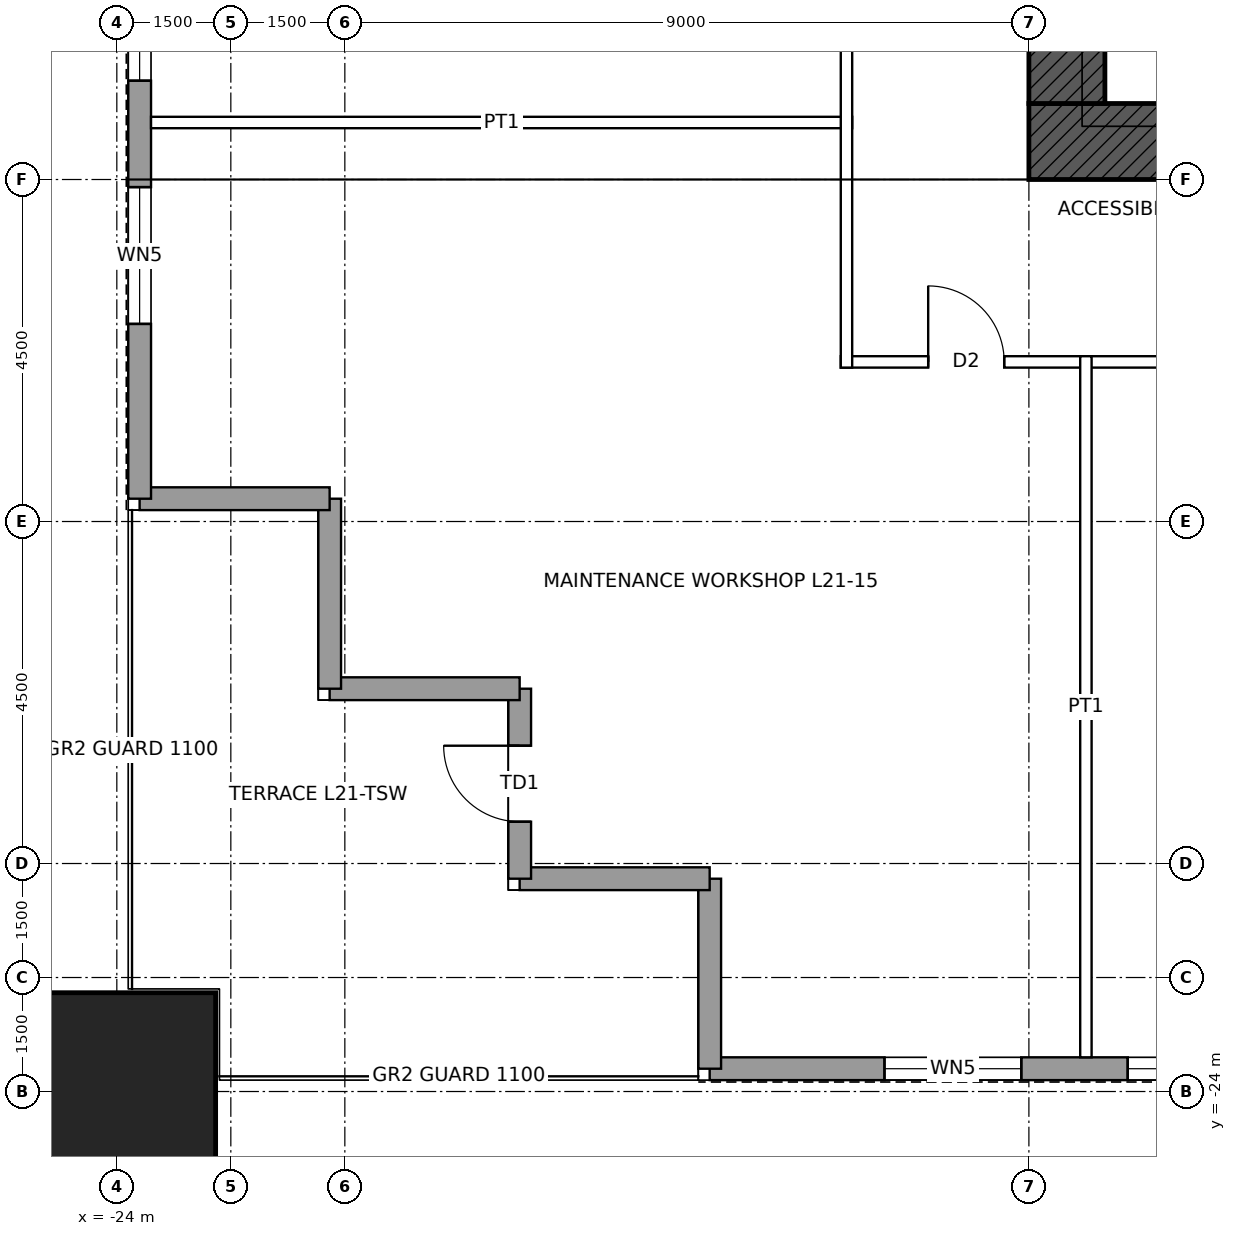
"""IFC4 building model, lengths in metres.
Left out: names, types, materials, properties, quantities, classifications, styles, units other than length and angle.
Written with IfcOpenShell. Run it as: python <this file> out.ifc"""

import sys

from ifc_helpers import new_model, si_unit, direction, frame, frame_2d, origin, origin_2d, place, context, subcontext, project, spatial, rectangle, hollow_rectangle, extrude, element, fill, save


model = new_model("IFC4")
c1 = context("Model", 3, precision=1e-05, world=origin(), true_north=direction((0.0, 1.0)))
c2 = subcontext(c1, "Body", "Model", "MODEL_VIEW")
j1 = project(units=[si_unit("LENGTHUNIT", "METRE"), si_unit("PLANEANGLEUNIT", "RADIAN")], contexts=[c1])
p1 = place(None, origin())
s1 = spatial("IfcSite", under=j1, at=p1, CompositionType="ELEMENT")
p2 = place(p1, origin())
s2 = spatial("IfcBuilding", under=s1, at=p2, CompositionType="ELEMENT")
p3 = place(p2, frame((0.0, 0.0, 108.9)))
s3 = spatial("IfcBuildingStorey", under=s2, at=p3, CompositionType="ELEMENT", Elevation=108.9)
p4 = place(p3, frame((-24.0, -24.0, 0.0), z_axis=(0.0, 0.0, 1.0), x_axis=(1.0, 0.0, 0.0)))
e1 = element("IfcColumn", 1, at=p4, inside=s3, PredefinedType="COLUMN", context=c2, shape_type="SweptSolid", body=[
    extrude(hollow_rectangle(XDim=2.6, YDim=2.6, WallThickness=0.13, at=origin_2d()), origin(), (0.0, 0.0, 1.0), 4.5),
])
p5 = place(p3, frame((12.0, -11.5, 0.0), z_axis=(0.0, 0.0, 1.0), x_axis=(-1.0, 0.0, 0.0)))
e2 = element("IfcWall", 2, at=p5, inside=s3, PredefinedType="SHEAR", context=c2, shape_type="SweptSolid", body=[
    extrude(rectangle(XDim=24.0, YDim=1.0, at=frame_2d((12.0, 0.0))), origin(), (0.0, 0.0, 1.0), 4.5),
])
p6 = place(p5, frame((11.5, 0.0, 0.0)))
e3 = element("IfcOpeningElement", 3, at=p6, cuts=e2, PredefinedType="OPENING", context=c2, shape_type="SweptSolid", body=[
    extrude(rectangle(XDim=1.0, YDim=2.1, at=frame_2d((0.5, 1.05))), frame((0.0, 0.51, 0.0), z_axis=(0.0, -1.0, 0.0), x_axis=(1.0, 0.0, 0.0)), (0.0, 0.0, 1.0), 1.02),
])
p7 = place(p5, frame((1.0, 0.0, 0.0)))
e4 = element("IfcOpeningElement", 4, at=p7, cuts=e2, PredefinedType="OPENING", context=c2, shape_type="SweptSolid", body=[
    extrude(rectangle(XDim=1.0, YDim=2.4, at=frame_2d((0.5, 1.2))), frame((0.0, 0.51, 0.0), z_axis=(0.0, -1.0, 0.0), x_axis=(1.0, 0.0, 0.0)), (0.0, 0.0, 1.0), 1.02),
])
p8 = place(p3, frame((-11.5, -11.0, 0.0), z_axis=(0.0, 0.0, 1.0), x_axis=(0.0, 1.0, 0.0)))
e5 = element("IfcWall", 5, at=p8, inside=s3, PredefinedType="SHEAR", context=c2, shape_type="SweptSolid", body=[
    extrude(rectangle(XDim=22.0, YDim=1.0, at=frame_2d((11.0, 0.0))), origin(), (0.0, 0.0, 1.0), 4.5),
])
p9 = place(p8, frame((10.5, 0.0, 0.0)))
e6 = element("IfcOpeningElement", 6, at=p9, cuts=e5, PredefinedType="OPENING", context=c2, shape_type="SweptSolid", body=[
    extrude(rectangle(XDim=1.0, YDim=2.4, at=frame_2d((0.5, 1.2))), frame((0.0, 0.51, 0.0), z_axis=(0.0, -1.0, 0.0), x_axis=(1.0, 0.0, 0.0)), (0.0, 0.0, 1.0), 1.02),
])
p10 = place(p3, frame((16.2, -23.7, 0.0), z_axis=(0.0, 0.0, 1.0), x_axis=(-1.0, 0.0, 0.0)))
e7 = element("IfcWall", 7, at=p10, inside=s3, PredefinedType="SOLIDWALL", context=c2, shape_type="SweptSolid", body=[
    extrude(rectangle(XDim=32.4, YDim=0.3, at=frame_2d((16.2, 0.0))), origin(), (0.0, 0.0, 1.0), 4.3),
])
p11 = place(p10, frame((2.3, 0.0, 1.0)))
e8 = element("IfcOpeningElement", 8, at=p11, cuts=e7, PredefinedType="OPENING", context=c2, shape_type="SweptSolid", body=[
    extrude(rectangle(XDim=1.8, YDim=1.2, at=frame_2d((0.9, 0.6))), frame((0.0, 0.16, 0.0), z_axis=(0.0, -1.0, 0.0), x_axis=(1.0, 0.0, 0.0)), (0.0, 0.0, 1.0), 0.32),
])
p12 = place(p10, frame((5.5, 0.0, 1.0)))
e9 = element("IfcOpeningElement", 9, at=p12, cuts=e7, PredefinedType="OPENING", context=c2, shape_type="SweptSolid", body=[
    extrude(rectangle(XDim=2.4, YDim=1.2, at=frame_2d((1.2, 0.6))), frame((0.0, 0.16, 0.0), z_axis=(0.0, -1.0, 0.0), x_axis=(1.0, 0.0, 0.0)), (0.0, 0.0, 1.0), 0.32),
])
p13 = place(p10, frame((9.5, 0.0, 1.0)))
e10 = element("IfcOpeningElement", 10, at=p13, cuts=e7, PredefinedType="OPENING", context=c2, shape_type="SweptSolid", body=[
    extrude(rectangle(XDim=2.4, YDim=1.2, at=frame_2d((1.2, 0.6))), frame((0.0, 0.16, 0.0), z_axis=(0.0, -1.0, 0.0), x_axis=(1.0, 0.0, 0.0)), (0.0, 0.0, 1.0), 0.32),
])
p14 = place(p10, frame((13.0, 0.0, 1.0)))
e11 = element("IfcOpeningElement", 11, at=p14, cuts=e7, PredefinedType="OPENING", context=c2, shape_type="SweptSolid", body=[
    extrude(rectangle(XDim=2.4, YDim=1.2, at=frame_2d((1.2, 0.6))), frame((0.0, 0.16, 0.0), z_axis=(0.0, -1.0, 0.0), x_axis=(1.0, 0.0, 0.0)), (0.0, 0.0, 1.0), 0.32),
])
p15 = place(p10, frame((17.0, 0.0, 1.0)))
e12 = element("IfcOpeningElement", 12, at=p15, cuts=e7, PredefinedType="OPENING", context=c2, shape_type="SweptSolid", body=[
    extrude(rectangle(XDim=2.4, YDim=1.2, at=frame_2d((1.2, 0.6))), frame((0.0, 0.16, 0.0), z_axis=(0.0, -1.0, 0.0), x_axis=(1.0, 0.0, 0.0)), (0.0, 0.0, 1.0), 0.32),
])
p16 = place(p10, frame((20.5, 0.0, 1.0)))
e13 = element("IfcOpeningElement", 13, at=p16, cuts=e7, PredefinedType="OPENING", context=c2, shape_type="SweptSolid", body=[
    extrude(rectangle(XDim=2.4, YDim=1.2, at=frame_2d((1.2, 0.6))), frame((0.0, 0.16, 0.0), z_axis=(0.0, -1.0, 0.0), x_axis=(1.0, 0.0, 0.0)), (0.0, 0.0, 1.0), 0.32),
])
p17 = place(p10, frame((24.5, 0.0, 1.0)))
e14 = element("IfcOpeningElement", 14, at=p17, cuts=e7, PredefinedType="OPENING", context=c2, shape_type="SweptSolid", body=[
    extrude(rectangle(XDim=2.4, YDim=1.2, at=frame_2d((1.2, 0.6))), frame((0.0, 0.16, 0.0), z_axis=(0.0, -1.0, 0.0), x_axis=(1.0, 0.0, 0.0)), (0.0, 0.0, 1.0), 0.32),
])
p18 = place(p10, frame((28.3, 0.0, 1.0)))
e15 = element("IfcOpeningElement", 15, at=p18, cuts=e7, PredefinedType="OPENING", context=c2, shape_type="SweptSolid", body=[
    extrude(rectangle(XDim=1.8, YDim=1.2, at=frame_2d((0.9, 0.6))), frame((0.0, 0.16, 0.0), z_axis=(0.0, -1.0, 0.0), x_axis=(1.0, 0.0, 0.0)), (0.0, 0.0, 1.0), 0.32),
])
for number, where, z_axis, x_axis in (
    (16, (-16.2, -23.7, 0.0), (0.0, 0.0, 1.0), (0.0, 1.0, 0.0)),
    (17, (-16.2, -21.2, 0.0), (0.0, 0.0, 1.0), (-1.0, 0.0, 0.0)),
):
    element("IfcWall", number, at=place(p3, frame(where, z_axis=z_axis, x_axis=x_axis)), inside=s3, PredefinedType="SOLIDWALL", context=c2, shape_type="SweptSolid", body=[
        extrude(rectangle(XDim=2.5, YDim=0.3, at=frame_2d((1.25, 0.0))), origin(), (0.0, 0.0, 1.0), 4.3),
    ])
p19 = place(p3, frame((-18.7, -21.2, 0.0), z_axis=(0.0, 0.0, 1.0), x_axis=(0.0, 1.0, 0.0)))
e18 = element("IfcWall", 18, at=p19, inside=s3, PredefinedType="SOLIDWALL", context=c2, shape_type="SweptSolid", body=[
    extrude(rectangle(XDim=2.5, YDim=0.3, at=frame_2d((1.25, 0.0))), origin(), (0.0, 0.0, 1.0), 4.3),
])
p20 = place(p19, frame((0.75, 0.0, 0.0)))
e19 = element("IfcOpeningElement", 19, at=p20, cuts=e18, PredefinedType="OPENING", context=c2, shape_type="SweptSolid", body=[
    extrude(rectangle(XDim=1.0, YDim=2.4, at=frame_2d((0.5, 1.2))), frame((0.0, 0.16, 0.0), z_axis=(0.0, -1.0, 0.0), x_axis=(1.0, 0.0, 0.0)), (0.0, 0.0, 1.0), 0.32),
])
for number, where, z_axis, x_axis in (
    (20, (-18.7, -18.7, 0.0), (0.0, 0.0, 1.0), (-1.0, 0.0, 0.0)),
    (21, (-21.2, -18.7, 0.0), (0.0, 0.0, 1.0), (0.0, 1.0, 0.0)),
    (22, (-21.2, -16.2, 0.0), (0.0, 0.0, 1.0), (-1.0, 0.0, 0.0)),
):
    element("IfcWall", number, at=place(p3, frame(where, z_axis=z_axis, x_axis=x_axis)), inside=s3, PredefinedType="SOLIDWALL", context=c2, shape_type="SweptSolid", body=[
        extrude(rectangle(XDim=2.5, YDim=0.3, at=frame_2d((1.25, 0.0))), origin(), (0.0, 0.0, 1.0), 4.3),
    ])
p21 = place(p3, frame((-23.7, -16.2, 0.0), z_axis=(0.0, 0.0, 1.0), x_axis=(0.0, 1.0, 0.0)))
e23 = element("IfcWall", 23, at=p21, inside=s3, PredefinedType="SOLIDWALL", context=c2, shape_type="SweptSolid", body=[
    extrude(rectangle(XDim=32.4, YDim=0.3, at=frame_2d((16.2, 0.0))), origin(), (0.0, 0.0, 1.0), 4.3),
])
p22 = place(p21, frame((2.3, 0.0, 1.0)))
e24 = element("IfcOpeningElement", 24, at=p22, cuts=e23, PredefinedType="OPENING", context=c2, shape_type="SweptSolid", body=[
    extrude(rectangle(XDim=1.8, YDim=1.2, at=frame_2d((0.9, 0.6))), frame((0.0, 0.16, 0.0), z_axis=(0.0, -1.0, 0.0), x_axis=(1.0, 0.0, 0.0)), (0.0, 0.0, 1.0), 0.32),
])
p23 = place(p21, frame((5.5, 0.0, 1.0)))
e25 = element("IfcOpeningElement", 25, at=p23, cuts=e23, PredefinedType="OPENING", context=c2, shape_type="SweptSolid", body=[
    extrude(rectangle(XDim=2.4, YDim=1.2, at=frame_2d((1.2, 0.6))), frame((0.0, 0.16, 0.0), z_axis=(0.0, -1.0, 0.0), x_axis=(1.0, 0.0, 0.0)), (0.0, 0.0, 1.0), 0.32),
])
p24 = place(p21, frame((9.5, 0.0, 1.0)))
e26 = element("IfcOpeningElement", 26, at=p24, cuts=e23, PredefinedType="OPENING", context=c2, shape_type="SweptSolid", body=[
    extrude(rectangle(XDim=2.4, YDim=1.2, at=frame_2d((1.2, 0.6))), frame((0.0, 0.16, 0.0), z_axis=(0.0, -1.0, 0.0), x_axis=(1.0, 0.0, 0.0)), (0.0, 0.0, 1.0), 0.32),
])
p25 = place(p21, frame((13.0, 0.0, 1.0)))
e27 = element("IfcOpeningElement", 27, at=p25, cuts=e23, PredefinedType="OPENING", context=c2, shape_type="SweptSolid", body=[
    extrude(rectangle(XDim=2.4, YDim=1.2, at=frame_2d((1.2, 0.6))), frame((0.0, 0.16, 0.0), z_axis=(0.0, -1.0, 0.0), x_axis=(1.0, 0.0, 0.0)), (0.0, 0.0, 1.0), 0.32),
])
p26 = place(p21, frame((17.0, 0.0, 1.0)))
e28 = element("IfcOpeningElement", 28, at=p26, cuts=e23, PredefinedType="OPENING", context=c2, shape_type="SweptSolid", body=[
    extrude(rectangle(XDim=2.4, YDim=1.2, at=frame_2d((1.2, 0.6))), frame((0.0, 0.16, 0.0), z_axis=(0.0, -1.0, 0.0), x_axis=(1.0, 0.0, 0.0)), (0.0, 0.0, 1.0), 0.32),
])
p27 = place(p21, frame((20.5, 0.0, 1.0)))
e29 = element("IfcOpeningElement", 29, at=p27, cuts=e23, PredefinedType="OPENING", context=c2, shape_type="SweptSolid", body=[
    extrude(rectangle(XDim=2.4, YDim=1.2, at=frame_2d((1.2, 0.6))), frame((0.0, 0.16, 0.0), z_axis=(0.0, -1.0, 0.0), x_axis=(1.0, 0.0, 0.0)), (0.0, 0.0, 1.0), 0.32),
])
p28 = place(p21, frame((24.5, 0.0, 1.0)))
e30 = element("IfcOpeningElement", 30, at=p28, cuts=e23, PredefinedType="OPENING", context=c2, shape_type="SweptSolid", body=[
    extrude(rectangle(XDim=2.4, YDim=1.2, at=frame_2d((1.2, 0.6))), frame((0.0, 0.16, 0.0), z_axis=(0.0, -1.0, 0.0), x_axis=(1.0, 0.0, 0.0)), (0.0, 0.0, 1.0), 0.32),
])
p29 = place(p21, frame((28.3, 0.0, 1.0)))
e31 = element("IfcOpeningElement", 31, at=p29, cuts=e23, PredefinedType="OPENING", context=c2, shape_type="SweptSolid", body=[
    extrude(rectangle(XDim=1.8, YDim=1.2, at=frame_2d((0.9, 0.6))), frame((0.0, 0.16, 0.0), z_axis=(0.0, -1.0, 0.0), x_axis=(1.0, 0.0, 0.0)), (0.0, 0.0, 1.0), 0.32),
])
p30 = place(p3, frame((-14.475, -14.4, 0.0), z_axis=(0.0, 0.0, 1.0), x_axis=(1.0, 0.0, 0.0)))
e32 = element("IfcWall", 32, at=p30, inside=s3, PredefinedType="PARTITIONING", context=c2, shape_type="SweptSolid", body=[
    extrude(rectangle(XDim=28.95, YDim=0.15, at=frame_2d((14.475, 0.0))), origin(), (0.0, 0.0, 1.0), 4.3),
])
p31 = place(p30, frame((21.075, 0.0, 0.0)))
e33 = element("IfcOpeningElement", 33, at=p31, cuts=e32, PredefinedType="OPENING", context=c2, shape_type="SweptSolid", body=[
    extrude(rectangle(XDim=1.8, YDim=2.4, at=frame_2d((0.9, 1.2))), frame((0.0, 0.085, 0.0), z_axis=(0.0, -1.0, 0.0), x_axis=(1.0, 0.0, 0.0)), (0.0, 0.0, 1.0), 0.17),
])
p32 = place(p30, frame((13.575, 0.0, 0.0)))
e34 = element("IfcOpeningElement", 34, at=p32, cuts=e32, PredefinedType="OPENING", context=c2, shape_type="SweptSolid", body=[
    extrude(rectangle(XDim=1.8, YDim=2.4, at=frame_2d((0.9, 1.2))), frame((0.0, 0.085, 0.0), z_axis=(0.0, -1.0, 0.0), x_axis=(1.0, 0.0, 0.0)), (0.0, 0.0, 1.0), 0.17),
])
p33 = place(p30, frame((6.475, 0.0, 0.0)))
e35 = element("IfcOpeningElement", 35, at=p33, cuts=e32, PredefinedType="OPENING", context=c2, shape_type="SweptSolid", body=[
    extrude(rectangle(XDim=1.0, YDim=2.1, at=frame_2d((0.5, 1.05))), frame((0.0, 0.085, 0.0), z_axis=(0.0, -1.0, 0.0), x_axis=(1.0, 0.0, 0.0)), (0.0, 0.0, 1.0), 0.17),
])
p34 = place(p30, frame((26.8, 0.0, 0.0)))
e36 = element("IfcOpeningElement", 36, at=p34, cuts=e32, PredefinedType="OPENING", context=c2, shape_type="SweptSolid", body=[
    extrude(rectangle(XDim=1.0, YDim=2.1, at=frame_2d((0.5, 1.05))), frame((0.0, 0.085, 0.0), z_axis=(0.0, -1.0, 0.0), x_axis=(1.0, 0.0, 0.0)), (0.0, 0.0, 1.0), 0.17),
])
p35 = place(p30, frame((1.15, 0.0, 0.0)))
e37 = element("IfcOpeningElement", 37, at=p35, cuts=e32, PredefinedType="OPENING", context=c2, shape_type="SweptSolid", body=[
    extrude(rectangle(XDim=1.0, YDim=2.1, at=frame_2d((0.5, 1.05))), frame((0.0, 0.085, 0.0), z_axis=(0.0, -1.0, 0.0), x_axis=(1.0, 0.0, 0.0)), (0.0, 0.0, 1.0), 0.17),
])
p36 = place(p3, frame((-23.55, -11.25, 0.0), z_axis=(0.0, 0.0, 1.0), x_axis=(1.0, 0.0, 0.0)))
e38 = element("IfcWall", 38, at=p36, inside=s3, PredefinedType="PARTITIONING", context=c2, shape_type="SweptSolid", body=[
    extrude(rectangle(XDim=9.225, YDim=0.15, at=frame_2d((4.613, 0.0))), origin(), (0.0, 0.0, 1.0), 3.431),
])
p37 = place(p3, frame((-14.4, -14.475, 0.0), z_axis=(0.0, 0.0, 1.0), x_axis=(0.0, 1.0, 0.0)))
e39 = element("IfcWall", 39, at=p37, inside=s3, PredefinedType="PARTITIONING", context=c2, shape_type="SweptSolid", body=[
    extrude(rectangle(XDim=28.95, YDim=0.15, at=frame_2d((14.475, 0.0))), origin(), (0.0, 0.0, 1.0), 4.3),
])
p38 = place(p37, frame((6.075, 0.0, 0.0)))
e40 = element("IfcOpeningElement", 40, at=p38, cuts=e39, PredefinedType="OPENING", context=c2, shape_type="SweptSolid", body=[
    extrude(rectangle(XDim=1.8, YDim=2.4, at=frame_2d((0.9, 1.2))), frame((0.0, 0.085, 0.0), z_axis=(0.0, -1.0, 0.0), x_axis=(1.0, 0.0, 0.0)), (0.0, 0.0, 1.0), 0.17),
])
p39 = place(p37, frame((17.325, 0.0, 0.0)))
e41 = element("IfcOpeningElement", 41, at=p39, cuts=e39, PredefinedType="OPENING", context=c2, shape_type="SweptSolid", body=[
    extrude(rectangle(XDim=1.8, YDim=2.4, at=frame_2d((0.9, 1.2))), frame((0.0, 0.085, 0.0), z_axis=(0.0, -1.0, 0.0), x_axis=(1.0, 0.0, 0.0)), (0.0, 0.0, 1.0), 0.17),
])
p40 = place(p3, frame((-11.25, -23.55, 0.0), z_axis=(0.0, 0.0, 1.0), x_axis=(0.0, 1.0, 0.0)))
e42 = element("IfcWall", 42, at=p40, inside=s3, PredefinedType="PARTITIONING", context=c2, shape_type="SweptSolid", body=[
    extrude(rectangle(XDim=9.225, YDim=0.15, at=frame_2d((4.613, 0.0))), origin(), (0.0, 0.0, 1.0), 3.431),
])
p41 = place(p17, origin())
e43 = element("IfcWindow", 43, at=p41, inside=s3, PartitioningType="SINGLE_PANEL", PredefinedType="WINDOW", context=c2, shape_type="SweptSolid", body=[
    extrude(rectangle(XDim=2.4, YDim=1.2, at=frame_2d((1.2, 0.6))), frame((0.0, 0.03, 0.0), z_axis=(0.0, -1.0, 0.0), x_axis=(1.0, 0.0, 0.0)), (0.0, 0.0, 1.0), 0.06),
])
fill(e14, e43)
p42 = place(p18, origin())
e44 = element("IfcWindow", 44, at=p42, inside=s3, PartitioningType="SINGLE_PANEL", PredefinedType="WINDOW", context=c2, shape_type="SweptSolid", body=[
    extrude(rectangle(XDim=1.8, YDim=1.2, at=frame_2d((0.9, 0.6))), frame((0.0, 0.03, 0.0), z_axis=(0.0, -1.0, 0.0), x_axis=(1.0, 0.0, 0.0)), (0.0, 0.0, 1.0), 0.06),
])
fill(e15, e44)
p43 = place(p20, origin())
e45 = element("IfcDoor", 45, at=p43, inside=s3, OperationType="SINGLE_SWING_RIGHT", PredefinedType="DOOR", context=c2, shape_type="SweptSolid", body=[
    extrude(rectangle(XDim=1.0, YDim=2.4, at=frame_2d((0.5, 1.2))), frame((0.0, 0.025, 0.0), z_axis=(0.0, -1.0, 0.0), x_axis=(1.0, 0.0, 0.0)), (0.0, 0.0, 1.0), 0.05),
])
fill(e19, e45)
p44 = place(p22, origin())
e46 = element("IfcWindow", 46, at=p44, inside=s3, PartitioningType="SINGLE_PANEL", PredefinedType="WINDOW", context=c2, shape_type="SweptSolid", body=[
    extrude(rectangle(XDim=1.8, YDim=1.2, at=frame_2d((0.9, 0.6))), frame((0.0, 0.03, 0.0), z_axis=(0.0, -1.0, 0.0), x_axis=(1.0, 0.0, 0.0)), (0.0, 0.0, 1.0), 0.06),
])
fill(e24, e46)
p45 = place(p23, origin())
e47 = element("IfcWindow", 47, at=p45, inside=s3, PartitioningType="SINGLE_PANEL", PredefinedType="WINDOW", context=c2, shape_type="SweptSolid", body=[
    extrude(rectangle(XDim=2.4, YDim=1.2, at=frame_2d((1.2, 0.6))), frame((0.0, 0.03, 0.0), z_axis=(0.0, -1.0, 0.0), x_axis=(1.0, 0.0, 0.0)), (0.0, 0.0, 1.0), 0.06),
])
fill(e25, e47)
p46 = place(p35, origin())
e48 = element("IfcDoor", 48, at=p46, inside=s3, OperationType="SINGLE_SWING_LEFT", PredefinedType="DOOR", context=c2, shape_type="SweptSolid", body=[
    extrude(rectangle(XDim=1.0, YDim=2.1, at=frame_2d((0.5, 1.05))), frame((0.0, 0.025, 0.0), z_axis=(0.0, -1.0, 0.0), x_axis=(1.0, 0.0, 0.0)), (0.0, 0.0, 1.0), 0.05),
])
fill(e37, e48)
save(model, sys.argv[1])
